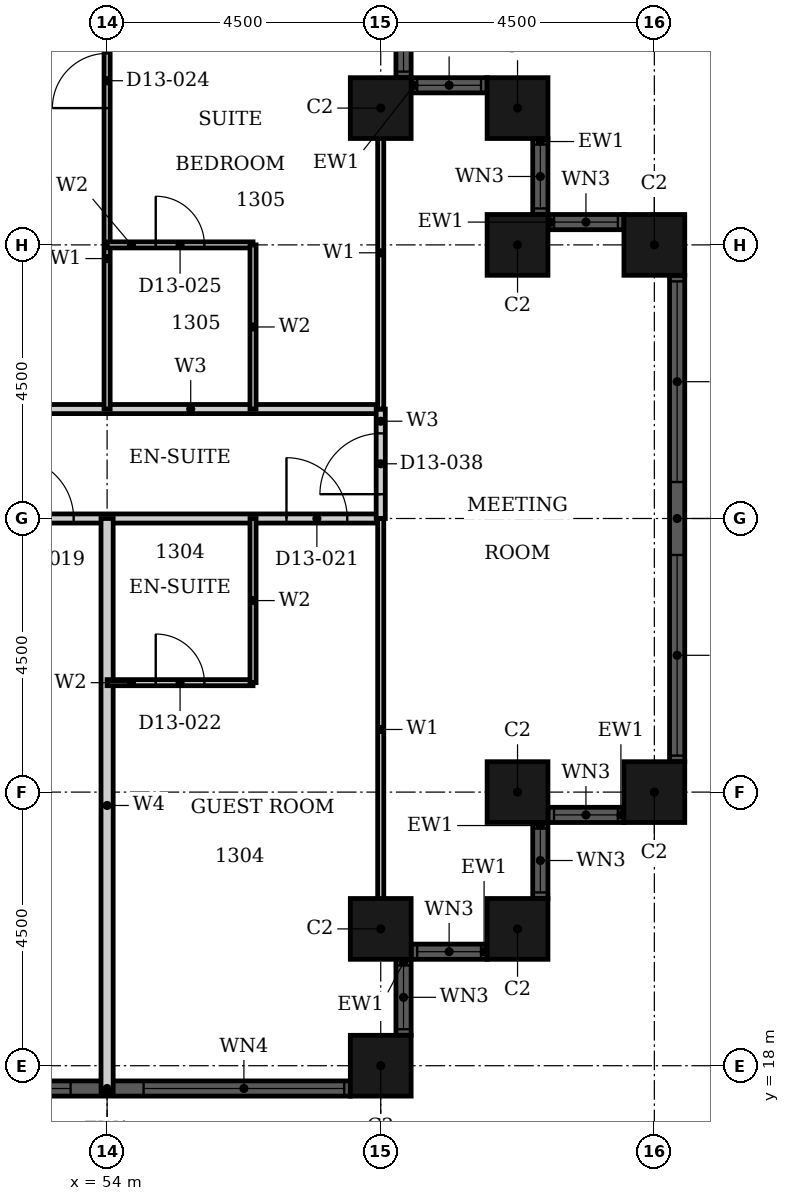
"""IFC4 building model, lengths in metres.
Left out: names, types, materials, properties, quantities, classifications, styles, units other than length and angle.
Written with IfcOpenShell. Run it as: python <this file> out.ifc"""

import sys

from ifc_helpers import new_model, si_unit, direction, frame, frame_2d, origin, origin_2d, place, context, subcontext, project, spatial, rectangle, hollow_rectangle, extrude, element, fill, save


model = new_model("IFC4")
c1 = context("Model", 3, precision=1e-05, world=origin(), true_north=direction((0.0, 1.0)))
c2 = subcontext(c1, "Body", "Model", "MODEL_VIEW")
j1 = project(units=[si_unit("LENGTHUNIT", "METRE"), si_unit("PLANEANGLEUNIT", "RADIAN")], contexts=[c1])
p1 = place(None, origin())
s1 = spatial("IfcSite", under=j1, at=p1, CompositionType="ELEMENT")
p2 = place(p1, origin())
s2 = spatial("IfcBuilding", under=s1, at=p2, CompositionType="ELEMENT")
p3 = place(p2, frame((0.0, 0.0, 60.0)))
s3 = spatial("IfcBuildingStorey", under=s2, at=p3, CompositionType="ELEMENT", Elevation=60.0)
for number, where, z_axis, x_axis in (
    (1, (58.5, 18.0, 0.0), (0.0, 0.0, 1.0), (1.0, 0.0, 0.0)),
    (2, (58.5, 20.25, 0.0), (0.0, 0.0, 1.0), (1.0, 0.0, 0.0)),
    (3, (60.75, 20.25, 0.0), (0.0, 0.0, 1.0), (1.0, 0.0, 0.0)),
    (4, (60.75, 22.5, 0.0), (0.0, 0.0, 1.0), (1.0, 0.0, 0.0)),
    (5, (63.0, 22.5, 0.0), (0.0, 0.0, 1.0), (1.0, 0.0, 0.0)),
    (6, (63.0, 31.5, 0.0), (0.0, 0.0, 1.0), (1.0, 0.0, 0.0)),
    (7, (60.75, 31.5, 0.0), (0.0, 0.0, 1.0), (1.0, 0.0, 0.0)),
    (8, (60.75, 33.75, 0.0), (0.0, 0.0, 1.0), (1.0, 0.0, 0.0)),
    (9, (58.5, 33.75, 0.0), (0.0, 0.0, 1.0), (1.0, 0.0, 0.0)),
):
    element("IfcColumn", number, at=place(p3, frame(where, z_axis=z_axis, x_axis=x_axis)), inside=s3, PredefinedType="COLUMN", context=c2, shape_type="SweptSolid", body=[
        extrude(hollow_rectangle(XDim=1.0, YDim=1.0, WallThickness=0.032, at=origin_2d()), origin(), (0.0, 0.0, 1.0), 3.6),
    ])
p4 = place(p3, frame((50.0, 17.625, 0.0), z_axis=(0.0, 0.0, 1.0), x_axis=(1.0, 0.0, 0.0)))
e10 = element("IfcWall", 10, at=p4, inside=s3, PredefinedType="SOLIDWALL", context=c2, shape_type="SweptSolid", body=[
    extrude(rectangle(XDim=8.0, YDim=0.25, at=frame_2d((4.0, 0.0))), origin(), (0.0, 0.0, 1.0), 3.6),
])
p5 = place(p4, frame((0.1, 0.0, 0.9)))
e11 = element("IfcOpeningElement", 11, at=p5, cuts=e10, PredefinedType="OPENING", context=c2, shape_type="SweptSolid", body=[
    extrude(rectangle(XDim=3.3, YDim=2.08, at=frame_2d((1.65, 1.04))), frame((0.0, 0.135, 0.0), z_axis=(0.0, -1.0, 0.0), x_axis=(1.0, 0.0, 0.0)), (0.0, 0.0, 1.0), 0.27),
])
p6 = place(p4, frame((4.6, 0.0, 0.9)))
e12 = element("IfcOpeningElement", 12, at=p6, cuts=e10, PredefinedType="OPENING", context=c2, shape_type="SweptSolid", body=[
    extrude(rectangle(XDim=3.3, YDim=2.08, at=frame_2d((1.65, 1.04))), frame((0.0, 0.135, 0.0), z_axis=(0.0, -1.0, 0.0), x_axis=(1.0, 0.0, 0.0)), (0.0, 0.0, 1.0), 0.27),
])
p7 = place(p3, frame((58.875, 18.5, 0.0), z_axis=(0.0, 0.0, 1.0), x_axis=(0.0, 1.0, 0.0)))
e13 = element("IfcWall", 13, at=p7, inside=s3, PredefinedType="SOLIDWALL", context=c2, shape_type="SweptSolid", body=[
    extrude(rectangle(XDim=1.25, YDim=0.25, at=frame_2d((0.625, 0.0))), origin(), (0.0, 0.0, 1.0), 3.6),
])
p8 = place(p7, frame((0.1, 0.0, 0.9)))
e14 = element("IfcOpeningElement", 14, at=p8, cuts=e13, PredefinedType="OPENING", context=c2, shape_type="SweptSolid", body=[
    extrude(rectangle(XDim=1.05, YDim=2.08, at=frame_2d((0.525, 1.04))), frame((0.0, 0.135, 0.0), z_axis=(0.0, -1.0, 0.0), x_axis=(1.0, 0.0, 0.0)), (0.0, 0.0, 1.0), 0.27),
])
p9 = place(p3, frame((59.0, 19.875, 0.0), z_axis=(0.0, 0.0, 1.0), x_axis=(1.0, 0.0, 0.0)))
e15 = element("IfcWall", 15, at=p9, inside=s3, PredefinedType="SOLIDWALL", context=c2, shape_type="SweptSolid", body=[
    extrude(rectangle(XDim=1.25, YDim=0.25, at=frame_2d((0.625, 0.0))), origin(), (0.0, 0.0, 1.0), 3.6),
])
p10 = place(p9, frame((0.1, 0.0, 0.9)))
e16 = element("IfcOpeningElement", 16, at=p10, cuts=e15, PredefinedType="OPENING", context=c2, shape_type="SweptSolid", body=[
    extrude(rectangle(XDim=1.05, YDim=2.08, at=frame_2d((0.525, 1.04))), frame((0.0, 0.135, 0.0), z_axis=(0.0, -1.0, 0.0), x_axis=(1.0, 0.0, 0.0)), (0.0, 0.0, 1.0), 0.27),
])
p11 = place(p3, frame((61.125, 20.75, 0.0), z_axis=(0.0, 0.0, 1.0), x_axis=(0.0, 1.0, 0.0)))
e17 = element("IfcWall", 17, at=p11, inside=s3, PredefinedType="SOLIDWALL", context=c2, shape_type="SweptSolid", body=[
    extrude(rectangle(XDim=1.25, YDim=0.25, at=frame_2d((0.625, 0.0))), origin(), (0.0, 0.0, 1.0), 3.6),
])
p12 = place(p11, frame((0.1, 0.0, 0.9)))
e18 = element("IfcOpeningElement", 18, at=p12, cuts=e17, PredefinedType="OPENING", context=c2, shape_type="SweptSolid", body=[
    extrude(rectangle(XDim=1.05, YDim=2.08, at=frame_2d((0.525, 1.04))), frame((0.0, 0.135, 0.0), z_axis=(0.0, -1.0, 0.0), x_axis=(1.0, 0.0, 0.0)), (0.0, 0.0, 1.0), 0.27),
])
p13 = place(p3, frame((61.25, 22.125, 0.0), z_axis=(0.0, 0.0, 1.0), x_axis=(1.0, 0.0, 0.0)))
e19 = element("IfcWall", 19, at=p13, inside=s3, PredefinedType="SOLIDWALL", context=c2, shape_type="SweptSolid", body=[
    extrude(rectangle(XDim=1.25, YDim=0.25, at=frame_2d((0.625, 0.0))), origin(), (0.0, 0.0, 1.0), 3.6),
])
p14 = place(p13, frame((0.1, 0.0, 0.9)))
e20 = element("IfcOpeningElement", 20, at=p14, cuts=e19, PredefinedType="OPENING", context=c2, shape_type="SweptSolid", body=[
    extrude(rectangle(XDim=1.05, YDim=2.08, at=frame_2d((0.525, 1.04))), frame((0.0, 0.135, 0.0), z_axis=(0.0, -1.0, 0.0), x_axis=(1.0, 0.0, 0.0)), (0.0, 0.0, 1.0), 0.27),
])
p15 = place(p3, frame((63.375, 23.0, 0.0), z_axis=(0.0, 0.0, 1.0), x_axis=(0.0, 1.0, 0.0)))
e21 = element("IfcWall", 21, at=p15, inside=s3, PredefinedType="SOLIDWALL", context=c2, shape_type="SweptSolid", body=[
    extrude(rectangle(XDim=8.0, YDim=0.25, at=frame_2d((4.0, 0.0))), origin(), (0.0, 0.0, 1.0), 3.6),
])
p16 = place(p15, frame((0.1, 0.0, 0.9)))
e22 = element("IfcOpeningElement", 22, at=p16, cuts=e21, PredefinedType="OPENING", context=c2, shape_type="SweptSolid", body=[
    extrude(rectangle(XDim=3.3, YDim=2.08, at=frame_2d((1.65, 1.04))), frame((0.0, 0.135, 0.0), z_axis=(0.0, -1.0, 0.0), x_axis=(1.0, 0.0, 0.0)), (0.0, 0.0, 1.0), 0.27),
])
p17 = place(p15, frame((4.6, 0.0, 0.9)))
e23 = element("IfcOpeningElement", 23, at=p17, cuts=e21, PredefinedType="OPENING", context=c2, shape_type="SweptSolid", body=[
    extrude(rectangle(XDim=3.3, YDim=2.08, at=frame_2d((1.65, 1.04))), frame((0.0, 0.135, 0.0), z_axis=(0.0, -1.0, 0.0), x_axis=(1.0, 0.0, 0.0)), (0.0, 0.0, 1.0), 0.27),
])
p18 = place(p3, frame((62.5, 31.875, 0.0), z_axis=(0.0, 0.0, 1.0), x_axis=(-1.0, 0.0, 0.0)))
e24 = element("IfcWall", 24, at=p18, inside=s3, PredefinedType="SOLIDWALL", context=c2, shape_type="SweptSolid", body=[
    extrude(rectangle(XDim=1.25, YDim=0.25, at=frame_2d((0.625, 0.0))), origin(), (0.0, 0.0, 1.0), 3.6),
])
p19 = place(p18, frame((0.1, 0.0, 0.9)))
e25 = element("IfcOpeningElement", 25, at=p19, cuts=e24, PredefinedType="OPENING", context=c2, shape_type="SweptSolid", body=[
    extrude(rectangle(XDim=1.05, YDim=2.08, at=frame_2d((0.525, 1.04))), frame((0.0, 0.135, 0.0), z_axis=(0.0, -1.0, 0.0), x_axis=(1.0, 0.0, 0.0)), (0.0, 0.0, 1.0), 0.27),
])
p20 = place(p3, frame((61.125, 32.0, 0.0), z_axis=(0.0, 0.0, 1.0), x_axis=(0.0, 1.0, 0.0)))
e26 = element("IfcWall", 26, at=p20, inside=s3, PredefinedType="SOLIDWALL", context=c2, shape_type="SweptSolid", body=[
    extrude(rectangle(XDim=1.25, YDim=0.25, at=frame_2d((0.625, 0.0))), origin(), (0.0, 0.0, 1.0), 3.6),
])
p21 = place(p20, frame((0.1, 0.0, 0.9)))
e27 = element("IfcOpeningElement", 27, at=p21, cuts=e26, PredefinedType="OPENING", context=c2, shape_type="SweptSolid", body=[
    extrude(rectangle(XDim=1.05, YDim=2.08, at=frame_2d((0.525, 1.04))), frame((0.0, 0.135, 0.0), z_axis=(0.0, -1.0, 0.0), x_axis=(1.0, 0.0, 0.0)), (0.0, 0.0, 1.0), 0.27),
])
p22 = place(p3, frame((60.25, 34.125, 0.0), z_axis=(0.0, 0.0, 1.0), x_axis=(-1.0, 0.0, 0.0)))
e28 = element("IfcWall", 28, at=p22, inside=s3, PredefinedType="SOLIDWALL", context=c2, shape_type="SweptSolid", body=[
    extrude(rectangle(XDim=1.25, YDim=0.25, at=frame_2d((0.625, 0.0))), origin(), (0.0, 0.0, 1.0), 3.6),
])
p23 = place(p22, frame((0.1, 0.0, 0.9)))
e29 = element("IfcOpeningElement", 29, at=p23, cuts=e28, PredefinedType="OPENING", context=c2, shape_type="SweptSolid", body=[
    extrude(rectangle(XDim=1.05, YDim=2.08, at=frame_2d((0.525, 1.04))), frame((0.0, 0.135, 0.0), z_axis=(0.0, -1.0, 0.0), x_axis=(1.0, 0.0, 0.0)), (0.0, 0.0, 1.0), 0.27),
])
p24 = place(p3, frame((58.875, 34.25, 0.0), z_axis=(0.0, 0.0, 1.0), x_axis=(0.0, 1.0, 0.0)))
e30 = element("IfcWall", 30, at=p24, inside=s3, PredefinedType="SOLIDWALL", context=c2, shape_type="SweptSolid", body=[
    extrude(rectangle(XDim=1.25, YDim=0.25, at=frame_2d((0.625, 0.0))), origin(), (0.0, 0.0, 1.0), 3.6),
])
p25 = place(p24, frame((0.1, 0.0, 0.9)))
e31 = element("IfcOpeningElement", 31, at=p25, cuts=e30, PredefinedType="OPENING", context=c2, shape_type="SweptSolid", body=[
    extrude(rectangle(XDim=1.05, YDim=2.08, at=frame_2d((0.525, 1.04))), frame((0.0, 0.135, 0.0), z_axis=(0.0, -1.0, 0.0), x_axis=(1.0, 0.0, 0.0)), (0.0, 0.0, 1.0), 0.27),
])
p26 = place(p3, frame((46.8, 27.0, 0.0), z_axis=(0.0, 0.0, 1.0), x_axis=(1.0, 0.0, 0.0)))
e32 = element("IfcWall", 32, at=p26, inside=s3, PredefinedType="PARTITIONING", context=c2, shape_type="SweptSolid", body=[
    extrude(rectangle(XDim=11.7, YDim=0.15, at=frame_2d((5.85, 0.0))), origin(), (0.0, 0.0, 1.0), 2.58),
])
p27 = place(p26, frame((5.65, 0.0, 0.0)))
e33 = element("IfcOpeningElement", 33, at=p27, cuts=e32, PredefinedType="OPENING", context=c2, shape_type="SweptSolid", body=[
    extrude(rectangle(XDim=1.0, YDim=2.1, at=frame_2d((0.5, 1.05))), frame((0.0, 0.085, 0.0), z_axis=(0.0, -1.0, 0.0), x_axis=(1.0, 0.0, 0.0)), (0.0, 0.0, 1.0), 0.17),
])
p28 = place(p26, frame((10.15, 0.0, 0.0)))
e34 = element("IfcOpeningElement", 34, at=p28, cuts=e32, PredefinedType="OPENING", context=c2, shape_type="SweptSolid", body=[
    extrude(rectangle(XDim=1.0, YDim=2.1, at=frame_2d((0.5, 1.05))), frame((0.0, 0.085, 0.0), z_axis=(0.0, -1.0, 0.0), x_axis=(1.0, 0.0, 0.0)), (0.0, 0.0, 1.0), 0.17),
])
p29 = place(p3, frame((46.8, 28.8, 0.0), z_axis=(0.0, 0.0, 1.0), x_axis=(1.0, 0.0, 0.0)))
e35 = element("IfcWall", 35, at=p29, inside=s3, PredefinedType="PARTITIONING", context=c2, shape_type="SweptSolid", body=[
    extrude(rectangle(XDim=11.7, YDim=0.15, at=frame_2d((5.85, 0.0))), origin(), (0.0, 0.0, 1.0), 3.3),
])
p30 = place(p29, frame((4.45, 0.0, 0.0)))
e36 = element("IfcOpeningElement", 36, at=p30, cuts=e35, PredefinedType="OPENING", context=c2, shape_type="SweptSolid", body=[
    extrude(rectangle(XDim=1.0, YDim=2.1, at=frame_2d((0.5, 1.05))), frame((0.0, 0.085, 0.0), z_axis=(0.0, -1.0, 0.0), x_axis=(1.0, 0.0, 0.0)), (0.0, 0.0, 1.0), 0.17),
])
p31 = place(p3, frame((58.5, 27.0, 0.0), z_axis=(0.0, 0.0, 1.0), x_axis=(0.0, 1.0, 0.0)))
e37 = element("IfcWall", 37, at=p31, inside=s3, PredefinedType="PARTITIONING", context=c2, shape_type="SweptSolid", body=[
    extrude(rectangle(XDim=1.8, YDim=0.15, at=frame_2d((0.9, 0.0))), origin(), (0.0, 0.0, 1.0), 3.3),
])
p32 = place(p31, frame((0.4, 0.0, 0.0)))
e38 = element("IfcOpeningElement", 38, at=p32, cuts=e37, PredefinedType="OPENING", context=c2, shape_type="SweptSolid", body=[
    extrude(rectangle(XDim=1.0, YDim=2.1, at=frame_2d((0.5, 1.05))), frame((0.0, 0.085, 0.0), z_axis=(0.0, -1.0, 0.0), x_axis=(1.0, 0.0, 0.0)), (0.0, 0.0, 1.0), 0.17),
])
p33 = place(p3, frame((54.0, 28.8, 0.0), z_axis=(0.0, 0.0, 1.0), x_axis=(0.0, 1.0, 0.0)))
e39 = element("IfcWall", 39, at=p33, inside=s3, PredefinedType="PARTITIONING", context=c2, shape_type="SweptSolid", body=[
    extrude(rectangle(XDim=7.64, YDim=0.1, at=frame_2d((3.82, 0.0))), origin(), (0.0, 0.0, 1.0), 3.3),
])
p34 = place(p33, frame((4.95, 0.0, 0.0)))
e40 = element("IfcOpeningElement", 40, at=p34, cuts=e39, PredefinedType="OPENING", context=c2, shape_type="SweptSolid", body=[
    extrude(rectangle(XDim=0.9, YDim=2.1, at=frame_2d((0.45, 1.05))), frame((0.0, 0.06, 0.0), z_axis=(0.0, -1.0, 0.0), x_axis=(1.0, 0.0, 0.0)), (0.0, 0.0, 1.0), 0.12),
])
p35 = place(p3, frame((58.5, 20.06, 0.0), z_axis=(0.0, 0.0, 1.0), x_axis=(0.0, 1.0, 0.0)))
e41 = element("IfcWall", 41, at=p35, inside=s3, PredefinedType="PARTITIONING", context=c2, shape_type="SweptSolid", body=[
    extrude(rectangle(XDim=6.94, YDim=0.1, at=frame_2d((3.47, 0.0))), origin(), (0.0, 0.0, 1.0), 3.3),
])
p36 = place(p3, frame((58.5, 28.8, 0.0), z_axis=(0.0, 0.0, 1.0), x_axis=(0.0, 1.0, 0.0)))
e42 = element("IfcWall", 42, at=p36, inside=s3, PredefinedType="PARTITIONING", context=c2, shape_type="SweptSolid", body=[
    extrude(rectangle(XDim=5.14, YDim=0.1, at=frame_2d((2.57, 0.0))), origin(), (0.0, 0.0, 1.0), 3.3),
])
p37 = place(p3, frame((54.0, 17.56, 0.0), z_axis=(0.0, 0.0, 1.0), x_axis=(0.0, 1.0, 0.0)))
e43 = element("IfcWall", 43, at=p37, inside=s3, PredefinedType="PARTITIONING", context=c2, shape_type="SweptSolid", body=[
    extrude(rectangle(XDim=9.44, YDim=0.2, at=frame_2d((4.72, 0.0))), origin(), (0.0, 0.0, 1.0), 3.3),
])
p38 = place(p3, frame((54.0, 24.3, 0.0), z_axis=(0.0, 0.0, 1.0), x_axis=(1.0, 0.0, 0.0)))
e44 = element("IfcWall", 44, at=p38, inside=s3, PredefinedType="PARTITIONING", context=c2, shape_type="SweptSolid", body=[
    extrude(rectangle(XDim=2.4, YDim=0.1, at=frame_2d((1.2, 0.0))), origin(), (0.0, 0.0, 1.0), 3.3),
])
p39 = place(p38, frame((0.8, 0.0, 0.0)))
e45 = element("IfcOpeningElement", 45, at=p39, cuts=e44, PredefinedType="OPENING", context=c2, shape_type="SweptSolid", body=[
    extrude(rectangle(XDim=0.8, YDim=2.1, at=frame_2d((0.4, 1.05))), frame((0.0, 0.06, 0.0), z_axis=(0.0, -1.0, 0.0), x_axis=(1.0, 0.0, 0.0)), (0.0, 0.0, 1.0), 0.12),
])
p40 = place(p3, frame((54.0, 31.5, 0.0), z_axis=(0.0, 0.0, 1.0), x_axis=(1.0, 0.0, 0.0)))
e46 = element("IfcWall", 46, at=p40, inside=s3, PredefinedType="PARTITIONING", context=c2, shape_type="SweptSolid", body=[
    extrude(rectangle(XDim=2.4, YDim=0.1, at=frame_2d((1.2, 0.0))), origin(), (0.0, 0.0, 1.0), 2.58),
])
p41 = place(p40, frame((0.8, 0.0, 0.0)))
e47 = element("IfcOpeningElement", 47, at=p41, cuts=e46, PredefinedType="OPENING", context=c2, shape_type="SweptSolid", body=[
    extrude(rectangle(XDim=0.8, YDim=2.1, at=frame_2d((0.4, 1.05))), frame((0.0, 0.06, 0.0), z_axis=(0.0, -1.0, 0.0), x_axis=(1.0, 0.0, 0.0)), (0.0, 0.0, 1.0), 0.12),
])
for number, where, z_axis, x_axis in (
    (48, (56.4, 24.3, 0.0), (0.0, 0.0, 1.0), (0.0, 1.0, 0.0)),
    (49, (56.4, 28.8, 0.0), (0.0, 0.0, 1.0), (0.0, 1.0, 0.0)),
):
    element("IfcWall", number, at=place(p3, frame(where, z_axis=z_axis, x_axis=x_axis)), inside=s3, PredefinedType="PARTITIONING", context=c2, shape_type="SweptSolid", body=[
        extrude(rectangle(XDim=2.7, YDim=0.1, at=frame_2d((1.35, 0.0))), origin(), (0.0, 0.0, 1.0), 3.3),
    ])
p42 = place(p5, origin())
e50 = element("IfcWindow", 50, at=p42, inside=s3, PartitioningType="SINGLE_PANEL", PredefinedType="WINDOW", context=c2, shape_type="SweptSolid", body=[
    extrude(rectangle(XDim=3.3, YDim=2.08, at=frame_2d((1.65, 1.04))), frame((0.0, 0.03, 0.0), z_axis=(0.0, -1.0, 0.0), x_axis=(1.0, 0.0, 0.0)), (0.0, 0.0, 1.0), 0.06),
])
fill(e11, e50)
p43 = place(p6, origin())
e51 = element("IfcWindow", 51, at=p43, inside=s3, PartitioningType="SINGLE_PANEL", PredefinedType="WINDOW", context=c2, shape_type="SweptSolid", body=[
    extrude(rectangle(XDim=3.3, YDim=2.08, at=frame_2d((1.65, 1.04))), frame((0.0, 0.03, 0.0), z_axis=(0.0, -1.0, 0.0), x_axis=(1.0, 0.0, 0.0)), (0.0, 0.0, 1.0), 0.06),
])
fill(e12, e51)
p44 = place(p8, origin())
e52 = element("IfcWindow", 52, at=p44, inside=s3, PartitioningType="SINGLE_PANEL", PredefinedType="WINDOW", context=c2, shape_type="SweptSolid", body=[
    extrude(rectangle(XDim=1.05, YDim=2.08, at=frame_2d((0.525, 1.04))), frame((0.0, 0.03, 0.0), z_axis=(0.0, -1.0, 0.0), x_axis=(1.0, 0.0, 0.0)), (0.0, 0.0, 1.0), 0.06),
])
fill(e14, e52)
p45 = place(p10, origin())
e53 = element("IfcWindow", 53, at=p45, inside=s3, PartitioningType="SINGLE_PANEL", PredefinedType="WINDOW", context=c2, shape_type="SweptSolid", body=[
    extrude(rectangle(XDim=1.05, YDim=2.08, at=frame_2d((0.525, 1.04))), frame((0.0, 0.03, 0.0), z_axis=(0.0, -1.0, 0.0), x_axis=(1.0, 0.0, 0.0)), (0.0, 0.0, 1.0), 0.06),
])
fill(e16, e53)
p46 = place(p12, origin())
e54 = element("IfcWindow", 54, at=p46, inside=s3, PartitioningType="SINGLE_PANEL", PredefinedType="WINDOW", context=c2, shape_type="SweptSolid", body=[
    extrude(rectangle(XDim=1.05, YDim=2.08, at=frame_2d((0.525, 1.04))), frame((0.0, 0.03, 0.0), z_axis=(0.0, -1.0, 0.0), x_axis=(1.0, 0.0, 0.0)), (0.0, 0.0, 1.0), 0.06),
])
fill(e18, e54)
p47 = place(p14, origin())
e55 = element("IfcWindow", 55, at=p47, inside=s3, PartitioningType="SINGLE_PANEL", PredefinedType="WINDOW", context=c2, shape_type="SweptSolid", body=[
    extrude(rectangle(XDim=1.05, YDim=2.08, at=frame_2d((0.525, 1.04))), frame((0.0, 0.03, 0.0), z_axis=(0.0, -1.0, 0.0), x_axis=(1.0, 0.0, 0.0)), (0.0, 0.0, 1.0), 0.06),
])
fill(e20, e55)
p48 = place(p16, origin())
e56 = element("IfcWindow", 56, at=p48, inside=s3, PartitioningType="SINGLE_PANEL", PredefinedType="WINDOW", context=c2, shape_type="SweptSolid", body=[
    extrude(rectangle(XDim=3.3, YDim=2.08, at=frame_2d((1.65, 1.04))), frame((0.0, 0.03, 0.0), z_axis=(0.0, -1.0, 0.0), x_axis=(1.0, 0.0, 0.0)), (0.0, 0.0, 1.0), 0.06),
])
fill(e22, e56)
p49 = place(p17, origin())
e57 = element("IfcWindow", 57, at=p49, inside=s3, PartitioningType="SINGLE_PANEL", PredefinedType="WINDOW", context=c2, shape_type="SweptSolid", body=[
    extrude(rectangle(XDim=3.3, YDim=2.08, at=frame_2d((1.65, 1.04))), frame((0.0, 0.03, 0.0), z_axis=(0.0, -1.0, 0.0), x_axis=(1.0, 0.0, 0.0)), (0.0, 0.0, 1.0), 0.06),
])
fill(e23, e57)
p50 = place(p19, origin())
e58 = element("IfcWindow", 58, at=p50, inside=s3, PartitioningType="SINGLE_PANEL", PredefinedType="WINDOW", context=c2, shape_type="SweptSolid", body=[
    extrude(rectangle(XDim=1.05, YDim=2.08, at=frame_2d((0.525, 1.04))), frame((0.0, 0.03, 0.0), z_axis=(0.0, -1.0, 0.0), x_axis=(1.0, 0.0, 0.0)), (0.0, 0.0, 1.0), 0.06),
])
fill(e25, e58)
p51 = place(p21, origin())
e59 = element("IfcWindow", 59, at=p51, inside=s3, PartitioningType="SINGLE_PANEL", PredefinedType="WINDOW", context=c2, shape_type="SweptSolid", body=[
    extrude(rectangle(XDim=1.05, YDim=2.08, at=frame_2d((0.525, 1.04))), frame((0.0, 0.03, 0.0), z_axis=(0.0, -1.0, 0.0), x_axis=(1.0, 0.0, 0.0)), (0.0, 0.0, 1.0), 0.06),
])
fill(e27, e59)
p52 = place(p23, origin())
e60 = element("IfcWindow", 60, at=p52, inside=s3, PartitioningType="SINGLE_PANEL", PredefinedType="WINDOW", context=c2, shape_type="SweptSolid", body=[
    extrude(rectangle(XDim=1.05, YDim=2.08, at=frame_2d((0.525, 1.04))), frame((0.0, 0.03, 0.0), z_axis=(0.0, -1.0, 0.0), x_axis=(1.0, 0.0, 0.0)), (0.0, 0.0, 1.0), 0.06),
])
fill(e29, e60)
p53 = place(p25, origin())
e61 = element("IfcWindow", 61, at=p53, inside=s3, PartitioningType="SINGLE_PANEL", PredefinedType="WINDOW", context=c2, shape_type="SweptSolid", body=[
    extrude(rectangle(XDim=1.05, YDim=2.08, at=frame_2d((0.525, 1.04))), frame((0.0, 0.03, 0.0), z_axis=(0.0, -1.0, 0.0), x_axis=(1.0, 0.0, 0.0)), (0.0, 0.0, 1.0), 0.06),
])
fill(e31, e61)
p54 = place(p27, origin())
e62 = element("IfcDoor", 62, at=p54, inside=s3, OperationType="SINGLE_SWING_RIGHT", PredefinedType="DOOR", context=c2, shape_type="SweptSolid", body=[
    extrude(rectangle(XDim=1.0, YDim=2.1, at=frame_2d((0.5, 1.05))), frame((0.0, 0.025, 0.0), z_axis=(0.0, -1.0, 0.0), x_axis=(1.0, 0.0, 0.0)), (0.0, 0.0, 1.0), 0.05),
])
fill(e33, e62)
p55 = place(p28, origin())
e63 = element("IfcDoor", 63, at=p55, inside=s3, OperationType="SINGLE_SWING_RIGHT", PredefinedType="DOOR", context=c2, shape_type="SweptSolid", body=[
    extrude(rectangle(XDim=1.0, YDim=2.1, at=frame_2d((0.5, 1.05))), frame((0.0, 0.025, 0.0), z_axis=(0.0, -1.0, 0.0), x_axis=(1.0, 0.0, 0.0)), (0.0, 0.0, 1.0), 0.05),
])
fill(e34, e63)
p56 = place(p39, origin())
e64 = element("IfcDoor", 64, at=p56, inside=s3, OperationType="SINGLE_SWING_RIGHT", PredefinedType="DOOR", context=c2, shape_type="SweptSolid", body=[
    extrude(rectangle(XDim=0.8, YDim=2.1, at=frame_2d((0.4, 1.05))), frame((0.0, 0.025, 0.0), z_axis=(0.0, -1.0, 0.0), x_axis=(1.0, 0.0, 0.0)), (0.0, 0.0, 1.0), 0.05),
])
fill(e45, e64)
p57 = place(p34, origin())
e65 = element("IfcDoor", 65, at=p57, inside=s3, OperationType="SINGLE_SWING_RIGHT", PredefinedType="DOOR", context=c2, shape_type="SweptSolid", body=[
    extrude(rectangle(XDim=0.9, YDim=2.1, at=frame_2d((0.45, 1.05))), frame((0.0, 0.025, 0.0), z_axis=(0.0, -1.0, 0.0), x_axis=(1.0, 0.0, 0.0)), (0.0, 0.0, 1.0), 0.05),
])
fill(e40, e65)
p58 = place(p41, origin())
e66 = element("IfcDoor", 66, at=p58, inside=s3, OperationType="SINGLE_SWING_LEFT", PredefinedType="DOOR", context=c2, shape_type="SweptSolid", body=[
    extrude(rectangle(XDim=0.8, YDim=2.1, at=frame_2d((0.4, 1.05))), frame((0.0, 0.025, 0.0), z_axis=(0.0, -1.0, 0.0), x_axis=(1.0, 0.0, 0.0)), (0.0, 0.0, 1.0), 0.05),
])
fill(e47, e66)
p59 = place(p32, origin())
e67 = element("IfcDoor", 67, at=p59, inside=s3, OperationType="SINGLE_SWING_LEFT", PredefinedType="DOOR", context=c2, shape_type="SweptSolid", body=[
    extrude(rectangle(XDim=1.0, YDim=2.1, at=frame_2d((0.5, 1.05))), frame((0.0, 0.025, 0.0), z_axis=(0.0, -1.0, 0.0), x_axis=(1.0, 0.0, 0.0)), (0.0, 0.0, 1.0), 0.05),
])
fill(e38, e67)
save(model, sys.argv[1])
